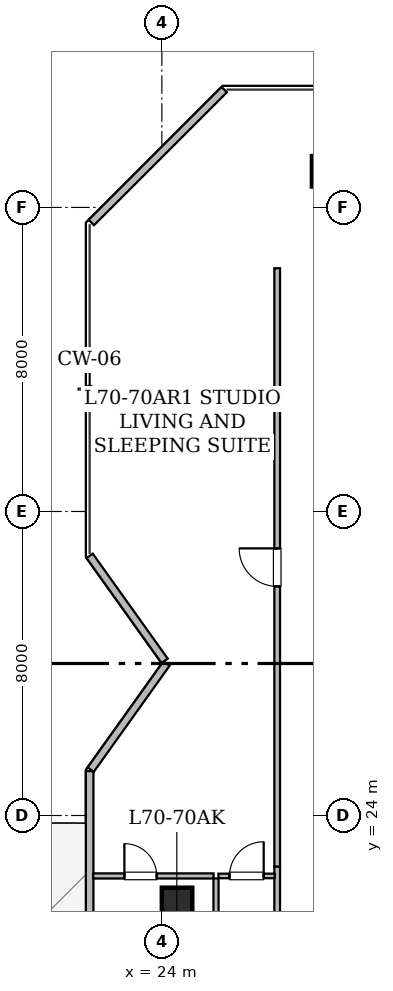
"""IFC4 building model, lengths in metres.
Left out: names, types, materials, properties, quantities, classifications, styles, units other than length and angle.
Written with IfcOpenShell. Run it as: python <this file> out.ifc"""

import sys

from ifc_helpers import new_model, si_unit, direction, frame, frame_2d, origin, origin_2d, place, context, subcontext, project, spatial, rectangle, hollow_rectangle, extrude, element, fill, save


model = new_model("IFC4")
c1 = context("Model", 3, precision=1e-05, world=origin(), true_north=direction((0.0, 1.0)))
c2 = subcontext(c1, "Body", "Model", "MODEL_VIEW")
j1 = project(units=[si_unit("LENGTHUNIT", "METRE"), si_unit("PLANEANGLEUNIT", "RADIAN")], contexts=[c1])
p1 = place(None, origin())
s1 = spatial("IfcSite", under=j1, at=p1, CompositionType="ELEMENT")
p2 = place(p1, origin())
s2 = spatial("IfcBuilding", under=s1, at=p2, CompositionType="ELEMENT")
p3 = place(p2, frame((0.0, 0.0, 273.65)))
s3 = spatial("IfcBuildingStorey", under=s2, at=p3, CompositionType="ELEMENT", Elevation=273.65)
for number, where, z_axis, x_axis in (
    (1, (28.35, 40.95, 0.0), (0.0, 0.0, 1.0), (1.0, 0.0, 0.0)),
    (2, (24.4, 21.7, 0.0), (0.0, 0.0, 1.0), (1.0, 0.0, 0.0)),
    (3, (24.4, 34.3, 0.0), (0.0, 0.0, 1.0), (1.0, 0.0, 0.0)),
):
    element("IfcColumn", number, at=place(p3, frame(where, z_axis=z_axis, x_axis=x_axis)), inside=s3, PredefinedType="COLUMN", context=c2, shape_type="SweptSolid", body=[
        extrude(hollow_rectangle(XDim=0.8, YDim=0.8, WallThickness=0.04, at=origin_2d()), origin(), (0.0, 0.0, 1.0), 4.175),
    ])
p4 = place(p3, frame((22.1, 16.504, 0.0), z_axis=(0.0, 0.0, 1.0), x_axis=(0.0, 1.0, 0.0)))
e4 = element("IfcWall", 4, at=p4, inside=s3, PredefinedType="STANDARD", context=c2, shape_type="SweptSolid", body=[
    extrude(rectangle(XDim=8.664, YDim=0.2, at=frame_2d((4.332, 0.0))), origin(), (0.0, 0.0, 1.0), 3.78),
])
p5 = place(p4, frame((0.935, 0.0, 0.0)))
e5 = element("IfcOpeningElement", 5, at=p5, cuts=e4, PredefinedType="OPENING", context=c2, shape_type="SweptSolid", body=[
    extrude(rectangle(XDim=1.1, YDim=2.2, at=frame_2d((0.55, 1.1))), frame((0.0, 0.11, 0.0), z_axis=(0.0, -1.0, 0.0), x_axis=(1.0, 0.0, 0.0)), (0.0, 0.0, 1.0), 0.22),
])
p6 = place(p3, frame((22.128, 25.208, 0.0), z_axis=(0.0, 0.0, 1.0), x_axis=(0.581399701415, 0.813618084358, 0.0)))
e6 = element("IfcWall", 6, at=p6, inside=s3, PredefinedType="STANDARD", context=c2, shape_type="SweptSolid", body=[
    extrude(rectangle(XDim=3.432, YDim=0.2, at=frame_2d((1.716, 0.0))), origin(), (0.0, 0.0, 1.0), 3.78),
])
p7 = place(p3, frame((24.074, 28.069, 0.0), z_axis=(0.0, 0.0, 1.0), x_axis=(-0.581306204583, 0.813684887726, 0.0)))
e7 = element("IfcWall", 7, at=p7, inside=s3, PredefinedType="STANDARD", context=c2, shape_type="SweptSolid", body=[
    extrude(rectangle(XDim=3.396, YDim=0.2, at=frame_2d((1.698, 0.0))), origin(), (0.0, 0.0, 1.0), 3.78),
])
p8 = place(p3, frame((22.144, 39.603, 0.0), z_axis=(0.0, 0.0, 1.0), x_axis=(0.707106781187, 0.707106781187, 0.0)))
e8 = element("IfcWall", 8, at=p8, inside=s3, PredefinedType="STANDARD", context=c2, shape_type="SweptSolid", body=[
    extrude(rectangle(XDim=4.946, YDim=0.2, at=frame_2d((2.473, 0.0))), origin(), (0.0, 0.0, 1.0), 3.78),
])
p9 = place(p3, frame((27.035, 17.6, 0.0), z_axis=(0.0, 0.0, 1.0), x_axis=(0.0, 1.0, 0.0)))
e9 = element("IfcWall", 9, at=p9, inside=s3, PredefinedType="STANDARD", context=c2, shape_type="SweptSolid", body=[
    extrude(rectangle(XDim=5.059, YDim=0.15, at=frame_2d((2.529, 0.0))), origin(), (0.0, 0.0, 1.0), 2.22),
])
p10 = place(p9, frame((2.009, 0.0, 0.0)))
e10 = element("IfcOpeningElement", 10, at=p10, cuts=e9, PredefinedType="OPENING", context=c2, shape_type="SweptSolid", body=[
    extrude(rectangle(XDim=1.0, YDim=2.15, at=frame_2d((0.5, 1.075))), frame((0.0, 0.085, 0.0), z_axis=(0.0, -1.0, 0.0), x_axis=(1.0, 0.0, 0.0)), (0.0, 0.0, 1.0), 0.17),
])
p11 = place(p3, frame((27.035, 22.659, 0.0), z_axis=(0.0, 0.0, 1.0), x_axis=(0.0, 1.0, 0.0)))
e11 = element("IfcWall", 11, at=p11, inside=s3, PredefinedType="STANDARD", context=c2, shape_type="SweptSolid", body=[
    extrude(rectangle(XDim=15.741, YDim=0.15, at=frame_2d((7.871, 0.0))), origin(), (0.0, 0.0, 1.0), 2.22),
])
p12 = place(p11, frame((7.37, 0.0, 0.0)))
e12 = element("IfcOpeningElement", 12, at=p12, cuts=e11, PredefinedType="OPENING", context=c2, shape_type="SweptSolid", body=[
    extrude(rectangle(XDim=1.0, YDim=2.15, at=frame_2d((0.5, 1.075))), frame((0.0, 0.085, 0.0), z_axis=(0.0, -1.0, 0.0), x_axis=(1.0, 0.0, 0.0)), (0.0, 0.0, 1.0), 0.17),
])
p13 = place(p3, frame((25.425, 19.495, 0.0), z_axis=(0.0, 0.0, 1.0), x_axis=(0.0, 1.0, 0.0)))
e13 = element("IfcWall", 13, at=p13, inside=s3, PredefinedType="PARTITIONING", context=c2, shape_type="SweptSolid", body=[
    extrude(rectangle(XDim=2.85, YDim=0.135, at=frame_2d((1.425, 0.0))), origin(), (0.0, 0.0, 1.0), 2.22),
])
p14 = place(p3, frame((25.49, 22.41, 0.0), z_axis=(0.0, 0.0, 1.0), x_axis=(1.0, 0.0, 0.0)))
e14 = element("IfcWall", 14, at=p14, inside=s3, PredefinedType="PARTITIONING", context=c2, shape_type="SweptSolid", body=[
    extrude(rectangle(XDim=1.48, YDim=0.12, at=frame_2d((0.74, 0.0))), origin(), (0.0, 0.0, 1.0), 2.67),
])
p15 = place(p14, frame((0.29, 0.0, 0.0)))
e15 = element("IfcOpeningElement", 15, at=p15, cuts=e14, PredefinedType="OPENING", context=c2, shape_type="SweptSolid", body=[
    extrude(rectangle(XDim=0.9, YDim=2.1, at=frame_2d((0.45, 1.05))), frame((0.0, 0.07, 0.0), z_axis=(0.0, -1.0, 0.0), x_axis=(1.0, 0.0, 0.0)), (0.0, 0.0, 1.0), 0.14),
])
p16 = place(p3, frame((22.192, 22.41, 0.0), z_axis=(0.0, 0.0, 1.0), x_axis=(1.0, 0.0, 0.0)))
e16 = element("IfcWall", 16, at=p16, inside=s3, PredefinedType="PARTITIONING", context=c2, shape_type="SweptSolid", body=[
    extrude(rectangle(XDim=3.168, YDim=0.135, at=frame_2d((1.584, 0.0))), origin(), (0.0, 0.0, 1.0), 2.22),
])
p17 = place(p16, frame((0.822, 0.0, 0.0)))
e17 = element("IfcOpeningElement", 17, at=p17, cuts=e16, PredefinedType="OPENING", context=c2, shape_type="SweptSolid", body=[
    extrude(rectangle(XDim=0.85, YDim=2.1, at=frame_2d((0.425, 1.05))), frame((0.0, 0.077, 0.0), z_axis=(0.0, -1.0, 0.0), x_axis=(1.0, 0.0, 0.0)), (0.0, 0.0, 1.0), 0.155),
])
p18 = place(p12, origin())
e18 = element("IfcDoor", 18, at=p18, inside=s3, OperationType="SINGLE_SWING_RIGHT", PredefinedType="DOOR", context=c2, shape_type="SweptSolid", body=[
    extrude(rectangle(XDim=1.0, YDim=2.15, at=frame_2d((0.5, 1.075))), frame((0.0, 0.025, 0.0), z_axis=(0.0, -1.0, 0.0), x_axis=(1.0, 0.0, 0.0)), (0.0, 0.0, 1.0), 0.05),
])
fill(e12, e18)
p19 = place(p15, origin())
e19 = element("IfcDoor", 19, at=p19, inside=s3, OperationType="SINGLE_SWING_RIGHT", PredefinedType="DOOR", context=c2, shape_type="SweptSolid", body=[
    extrude(rectangle(XDim=0.9, YDim=2.1, at=frame_2d((0.45, 1.05))), frame((0.0, 0.025, 0.0), z_axis=(0.0, -1.0, 0.0), x_axis=(1.0, 0.0, 0.0)), (0.0, 0.0, 1.0), 0.05),
])
fill(e15, e19)
p20 = place(p17, origin())
e20 = element("IfcDoor", 20, at=p20, inside=s3, OperationType="SINGLE_SWING_LEFT", PredefinedType="DOOR", context=c2, shape_type="SweptSolid", body=[
    extrude(rectangle(XDim=0.85, YDim=2.1, at=frame_2d((0.425, 1.05))), frame((0.0, 0.025, 0.0), z_axis=(0.0, -1.0, 0.0), x_axis=(1.0, 0.0, 0.0)), (0.0, 0.0, 1.0), 0.05),
])
fill(e17, e20)
save(model, sys.argv[1])
